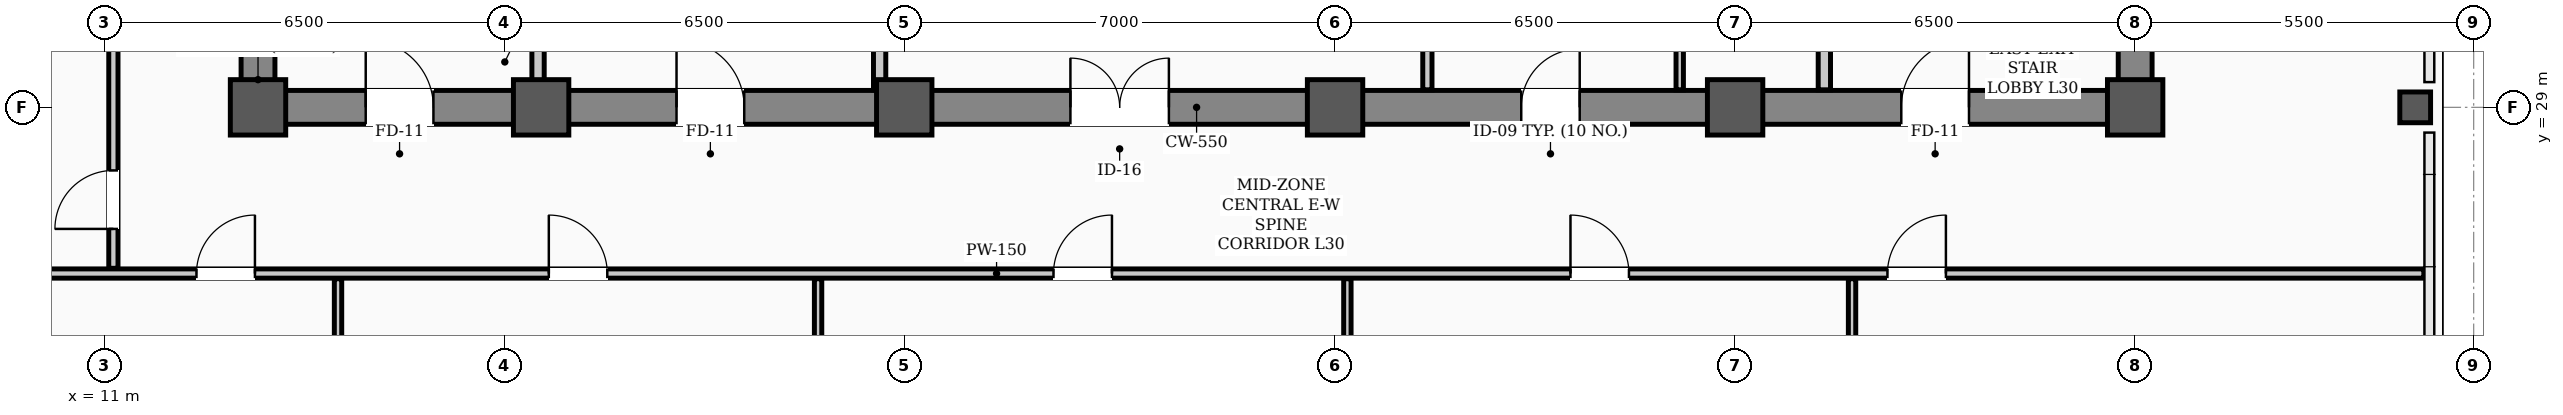
"""IFC4 building model, lengths in metres.
Left out: names, types, materials, properties, quantities, classifications, styles, units other than length and angle.
Written with IfcOpenShell. Run it as: python <this file> out.ifc"""

import sys

from ifc_helpers import new_model, si_unit, direction, frame, frame_2d, origin, origin_2d, place, context, subcontext, project, spatial, rectangle, hollow_rectangle, extrude, element, fill, save


model = new_model("IFC4")
c1 = context("Model", 3, precision=1e-05, world=origin(), true_north=direction((0.0, 1.0)))
c2 = subcontext(c1, "Body", "Model", "MODEL_VIEW")
j1 = project(units=[si_unit("LENGTHUNIT", "METRE"), si_unit("PLANEANGLEUNIT", "RADIAN")], contexts=[c1])
p1 = place(None, origin())
s1 = spatial("IfcSite", under=j1, at=p1, CompositionType="ELEMENT")
p2 = place(p1, origin())
s2 = spatial("IfcBuilding", under=s1, at=p2, CompositionType="ELEMENT")
p3 = place(p2, frame((0.0, 0.0, 122.7)))
s3 = spatial("IfcBuildingStorey", under=s2, at=p3, CompositionType="ELEMENT", Elevation=122.7)
for number, where, z_axis, x_axis in (
    (1, (13.5, 29.0, 0.0), (0.0, 0.0, 1.0), (1.0, 0.0, 0.0)),
    (2, (18.1, 29.0, 0.0), (0.0, 0.0, 1.0), (1.0, 0.0, 0.0)),
    (3, (24.0, 29.0, 0.0), (0.0, 0.0, 1.0), (1.0, 0.0, 0.0)),
    (4, (31.0, 29.0, 0.0), (0.0, 0.0, 1.0), (1.0, 0.0, 0.0)),
    (5, (37.5, 29.0, 0.0), (0.0, 0.0, 1.0), (1.0, 0.0, 0.0)),
    (6, (44.0, 29.0, 0.0), (0.0, 0.0, 1.0), (1.0, 0.0, 0.0)),
):
    element("IfcColumn", number, at=place(p3, frame(where, z_axis=z_axis, x_axis=x_axis)), inside=s3, PredefinedType="COLUMN", context=c2, shape_type="SweptSolid", body=[
        extrude(hollow_rectangle(XDim=0.9, YDim=0.9, WallThickness=0.035, InnerFilletRadius=0.017, OuterFilletRadius=0.052, at=origin_2d()), origin(), (0.0, 0.0, 1.0), 3.9),
    ])
p4 = place(p3, frame((48.55, 29.0, 0.0), z_axis=(0.0, 0.0, 1.0), x_axis=(1.0, 0.0, 0.0)))
e7 = element("IfcColumn", 7, at=p4, inside=s3, PredefinedType="COLUMN", context=c2, shape_type="SweptSolid", body=[
    extrude(hollow_rectangle(XDim=0.5, YDim=0.5, WallThickness=0.024, InnerFilletRadius=0.012, OuterFilletRadius=0.036, at=origin_2d()), origin(), (0.0, 0.0, 1.0), 3.9),
])
p5 = place(p3, frame((13.5, 29.0, 0.0), z_axis=(0.0, 0.0, 1.0), x_axis=(1.0, 0.0, 0.0)))
e8 = element("IfcWall", 8, at=p5, inside=s3, PredefinedType="SHEAR", context=c2, shape_type="SweptSolid", body=[
    extrude(rectangle(XDim=30.5, YDim=0.55, at=frame_2d((15.25, 0.0))), origin(), (0.0, 0.0, 1.0), 3.72),
])
p6 = place(p5, frame((1.75, 0.0, 0.0)))
e9 = element("IfcOpeningElement", 9, at=p6, cuts=e8, PredefinedType="OPENING", context=c2, shape_type="SweptSolid", body=[
    extrude(rectangle(XDim=1.1, YDim=2.08, at=frame_2d((0.55, 1.04))), frame((0.0, 0.285, 0.0), z_axis=(0.0, -1.0, 0.0), x_axis=(1.0, 0.0, 0.0)), (0.0, 0.0, 1.0), 0.57),
])
p7 = place(p5, frame((26.7, 0.0, 0.0)))
e10 = element("IfcOpeningElement", 10, at=p7, cuts=e8, PredefinedType="OPENING", context=c2, shape_type="SweptSolid", body=[
    extrude(rectangle(XDim=1.1, YDim=2.08, at=frame_2d((0.55, 1.04))), frame((0.0, 0.285, 0.0), z_axis=(0.0, -1.0, 0.0), x_axis=(1.0, 0.0, 0.0)), (0.0, 0.0, 1.0), 0.57),
])
p8 = place(p5, frame((6.8, 0.0, 0.0)))
e11 = element("IfcOpeningElement", 11, at=p8, cuts=e8, PredefinedType="OPENING", context=c2, shape_type="SweptSolid", body=[
    extrude(rectangle(XDim=1.1, YDim=2.08, at=frame_2d((0.55, 1.04))), frame((0.0, 0.285, 0.0), z_axis=(0.0, -1.0, 0.0), x_axis=(1.0, 0.0, 0.0)), (0.0, 0.0, 1.0), 0.57),
])
p9 = place(p5, frame((13.2, 0.0, 0.0)))
e12 = element("IfcOpeningElement", 12, at=p9, cuts=e8, PredefinedType="OPENING", context=c2, shape_type="SweptSolid", body=[
    extrude(rectangle(XDim=1.6, YDim=2.08, at=frame_2d((0.8, 1.04))), frame((0.0, 0.285, 0.0), z_axis=(0.0, -1.0, 0.0), x_axis=(1.0, 0.0, 0.0)), (0.0, 0.0, 1.0), 0.57),
])
p10 = place(p5, frame((20.525, 0.0, 0.0)))
e13 = element("IfcOpeningElement", 13, at=p10, cuts=e8, PredefinedType="OPENING", context=c2, shape_type="SweptSolid", body=[
    extrude(rectangle(XDim=0.95, YDim=2.08, at=frame_2d((0.475, 1.04))), frame((0.0, 0.285, 0.0), z_axis=(0.0, -1.0, 0.0), x_axis=(1.0, 0.0, 0.0)), (0.0, 0.0, 1.0), 0.57),
])
for number, where, z_axis, x_axis in (
    (14, (13.5, 29.35, 0.0), (0.0, 0.0, 1.0), (0.0, 1.0, 0.0)),
    (15, (44.0, 29.35, 0.0), (0.0, 0.0, 1.0), (0.0, 1.0, 0.0)),
):
    element("IfcWall", number, at=place(p3, frame(where, z_axis=z_axis, x_axis=x_axis)), inside=s3, PredefinedType="SHEAR", context=c2, shape_type="SweptSolid", body=[
        extrude(rectangle(XDim=8.6, YDim=0.55, at=frame_2d((4.3, 0.0))), origin(), (0.0, 0.0, 1.0), 3.72),
    ])
p11 = place(p3, frame((2.31, 26.3, 0.0), z_axis=(0.0, 0.0, 1.0), x_axis=(1.0, 0.0, 0.0)))
e16 = element("IfcWall", 16, at=p11, inside=s3, PredefinedType="PARTITIONING", context=c2, shape_type="SweptSolid", body=[
    extrude(rectangle(XDim=46.38, YDim=0.15, at=frame_2d((23.19, 0.0))), origin(), (0.0, 0.0, 1.0), 3.1),
])
p12 = place(p11, frame((10.19, 0.0, 0.0)))
e17 = element("IfcOpeningElement", 17, at=p12, cuts=e16, PredefinedType="OPENING", context=c2, shape_type="SweptSolid", body=[
    extrude(rectangle(XDim=0.95, YDim=2.08, at=frame_2d((0.475, 1.04))), frame((0.0, 0.085, 0.0), z_axis=(0.0, -1.0, 0.0), x_axis=(1.0, 0.0, 0.0)), (0.0, 0.0, 1.0), 0.17),
])
p13 = place(p11, frame((15.915, 0.0, 0.0)))
e18 = element("IfcOpeningElement", 18, at=p13, cuts=e16, PredefinedType="OPENING", context=c2, shape_type="SweptSolid", body=[
    extrude(rectangle(XDim=0.95, YDim=2.08, at=frame_2d((0.475, 1.04))), frame((0.0, 0.085, 0.0), z_axis=(0.0, -1.0, 0.0), x_axis=(1.0, 0.0, 0.0)), (0.0, 0.0, 1.0), 0.17),
])
p14 = place(p11, frame((24.115, 0.0, 0.0)))
e19 = element("IfcOpeningElement", 19, at=p14, cuts=e16, PredefinedType="OPENING", context=c2, shape_type="SweptSolid", body=[
    extrude(rectangle(XDim=0.95, YDim=2.08, at=frame_2d((0.475, 1.04))), frame((0.0, 0.085, 0.0), z_axis=(0.0, -1.0, 0.0), x_axis=(1.0, 0.0, 0.0)), (0.0, 0.0, 1.0), 0.17),
])
p15 = place(p11, frame((32.515, 0.0, 0.0)))
e20 = element("IfcOpeningElement", 20, at=p15, cuts=e16, PredefinedType="OPENING", context=c2, shape_type="SweptSolid", body=[
    extrude(rectangle(XDim=0.95, YDim=2.08, at=frame_2d((0.475, 1.04))), frame((0.0, 0.085, 0.0), z_axis=(0.0, -1.0, 0.0), x_axis=(1.0, 0.0, 0.0)), (0.0, 0.0, 1.0), 0.17),
])
p16 = place(p11, frame((37.665, 0.0, 0.0)))
e21 = element("IfcOpeningElement", 21, at=p16, cuts=e16, PredefinedType="OPENING", context=c2, shape_type="SweptSolid", body=[
    extrude(rectangle(XDim=0.95, YDim=2.08, at=frame_2d((0.475, 1.04))), frame((0.0, 0.085, 0.0), z_axis=(0.0, -1.0, 0.0), x_axis=(1.0, 0.0, 0.0)), (0.0, 0.0, 1.0), 0.17),
])
for number, where, z_axis, x_axis in (
    (22, (18.05, 29.285, 0.0), (0.0, 0.0, 1.0), (0.0, 1.0, 0.0)),
    (23, (38.95, 29.285, 0.0), (0.0, 0.0, 1.0), (0.0, 1.0, 0.0)),
):
    element("IfcWall", number, at=place(p3, frame(where, z_axis=z_axis, x_axis=x_axis)), inside=s3, PredefinedType="STANDARD", context=c2, shape_type="SweptSolid", body=[
        extrude(rectangle(XDim=1.015, YDim=0.2, at=frame_2d((0.508, 0.0))), origin(), (0.0, 0.0, 1.0), 3.3),
    ])
p17 = place(p3, frame((23.6, 29.285, 0.0), z_axis=(0.0, 0.0, 1.0), x_axis=(0.0, 1.0, 0.0)))
e24 = element("IfcWall", 24, at=p17, inside=s3, PredefinedType="STANDARD", context=c2, shape_type="SweptSolid", body=[
    extrude(rectangle(XDim=5.415, YDim=0.2, at=frame_2d((2.708, 0.0))), origin(), (0.0, 0.0, 1.0), 3.1),
])
p18 = place(p3, frame((32.5, 29.285, 0.0), z_axis=(0.0, 0.0, 1.0), x_axis=(0.0, 1.0, 0.0)))
e25 = element("IfcWall", 25, at=p18, inside=s3, PredefinedType="PARTITIONING", context=c2, shape_type="SweptSolid", body=[
    extrude(rectangle(XDim=2.48, YDim=0.15, at=frame_2d((1.24, 0.0))), origin(), (0.0, 0.0, 1.0), 3.3),
])
p19 = place(p3, frame((36.6, 29.285, 0.0), z_axis=(0.0, 0.0, 1.0), x_axis=(0.0, 1.0, 0.0)))
e26 = element("IfcWall", 26, at=p19, inside=s3, PredefinedType="PARTITIONING", context=c2, shape_type="SweptSolid", body=[
    extrude(rectangle(XDim=2.48, YDim=0.12, at=frame_2d((1.24, 0.0))), origin(), (0.0, 0.0, 1.0), 3.3),
])
p20 = place(p3, frame((11.15, 26.385, 0.0), z_axis=(0.0, 0.0, 1.0), x_axis=(0.0, 1.0, 0.0)))
e27 = element("IfcWall", 27, at=p20, inside=s3, PredefinedType="PARTITIONING", context=c2, shape_type="SweptSolid", body=[
    extrude(rectangle(XDim=11.28, YDim=0.15, at=frame_2d((5.64, 0.0))), origin(), (0.0, 0.0, 1.0), 3.0),
])
p21 = place(p20, frame((0.64, 0.0, 0.0)))
e28 = element("IfcOpeningElement", 28, at=p21, cuts=e27, PredefinedType="OPENING", context=c2, shape_type="SweptSolid", body=[
    extrude(rectangle(XDim=0.95, YDim=2.08, at=frame_2d((0.475, 1.04))), frame((0.0, 0.085, 0.0), z_axis=(0.0, -1.0, 0.0), x_axis=(1.0, 0.0, 0.0)), (0.0, 0.0, 1.0), 0.17),
])
p22 = place(p20, frame((8.615, 0.0, 0.0)))
e29 = element("IfcOpeningElement", 29, at=p22, cuts=e27, PredefinedType="OPENING", context=c2, shape_type="SweptSolid", body=[
    extrude(rectangle(XDim=0.95, YDim=2.08, at=frame_2d((0.475, 1.04))), frame((0.0, 0.085, 0.0), z_axis=(0.0, -1.0, 0.0), x_axis=(1.0, 0.0, 0.0)), (0.0, 0.0, 1.0), 0.17),
])
p23 = place(p3, frame((14.8, 10.81, 0.0), z_axis=(0.0, 0.0, 1.0), x_axis=(0.0, 1.0, 0.0)))
e30 = element("IfcWall", 30, at=p23, inside=s3, PredefinedType="PARTITIONING", context=c2, shape_type="SweptSolid", body=[
    extrude(rectangle(XDim=15.405, YDim=0.12, at=frame_2d((7.703, 0.0))), origin(), (0.0, 0.0, 1.0), 3.0),
])
p24 = place(p3, frame((22.6, 12.57, 0.0), z_axis=(0.0, 0.0, 1.0), x_axis=(0.0, 1.0, 0.0)))
e31 = element("IfcWall", 31, at=p24, inside=s3, PredefinedType="PARTITIONING", context=c2, shape_type="SweptSolid", body=[
    extrude(rectangle(XDim=13.645, YDim=0.12, at=frame_2d((6.823, 0.0))), origin(), (0.0, 0.0, 1.0), 3.0),
])
for number, where, z_axis, x_axis in (
    (32, (31.2, 10.81, 0.0), (0.0, 0.0, 1.0), (0.0, 1.0, 0.0)),
    (33, (39.4, 10.81, 0.0), (0.0, 0.0, 1.0), (0.0, 1.0, 0.0)),
):
    element("IfcWall", number, at=place(p3, frame(where, z_axis=z_axis, x_axis=x_axis)), inside=s3, PredefinedType="PARTITIONING", context=c2, shape_type="SweptSolid", body=[
        extrude(rectangle(XDim=15.405, YDim=0.12, at=frame_2d((7.703, 0.0))), origin(), (0.0, 0.0, 1.0), 3.0),
    ])
p25 = place(p6, origin())
e34 = element("IfcDoor", 34, at=p25, inside=s3, OperationType="SINGLE_SWING_LEFT", PredefinedType="DOOR", context=c2, shape_type="SweptSolid", body=[
    extrude(rectangle(XDim=1.1, YDim=2.08, at=frame_2d((0.55, 1.04))), frame((0.0, 0.025, 0.0), z_axis=(0.0, -1.0, 0.0), x_axis=(1.0, 0.0, 0.0)), (0.0, 0.0, 1.0), 0.05),
])
fill(e9, e34)
p26 = place(p7, origin())
e35 = element("IfcDoor", 35, at=p26, inside=s3, OperationType="SINGLE_SWING_RIGHT", PredefinedType="DOOR", context=c2, shape_type="SweptSolid", body=[
    extrude(rectangle(XDim=1.1, YDim=2.08, at=frame_2d((0.55, 1.04))), frame((0.0, 0.025, 0.0), z_axis=(0.0, -1.0, 0.0), x_axis=(1.0, 0.0, 0.0)), (0.0, 0.0, 1.0), 0.05),
])
fill(e10, e35)
p27 = place(p8, origin())
e36 = element("IfcDoor", 36, at=p27, inside=s3, OperationType="SINGLE_SWING_LEFT", PredefinedType="DOOR", context=c2, shape_type="SweptSolid", body=[
    extrude(rectangle(XDim=1.1, YDim=2.08, at=frame_2d((0.55, 1.04))), frame((0.0, 0.025, 0.0), z_axis=(0.0, -1.0, 0.0), x_axis=(1.0, 0.0, 0.0)), (0.0, 0.0, 1.0), 0.05),
])
fill(e11, e36)
p28 = place(p9, origin())
e37 = element("IfcDoor", 37, at=p28, inside=s3, OperationType="DOUBLE_DOOR_SINGLE_SWING", PredefinedType="DOOR", context=c2, shape_type="SweptSolid", body=[
    extrude(rectangle(XDim=1.6, YDim=2.08, at=frame_2d((0.8, 1.04))), frame((0.0, 0.025, 0.0), z_axis=(0.0, -1.0, 0.0), x_axis=(1.0, 0.0, 0.0)), (0.0, 0.0, 1.0), 0.05),
])
fill(e12, e37)
p29 = place(p10, origin())
e38 = element("IfcDoor", 38, at=p29, inside=s3, OperationType="SINGLE_SWING_RIGHT", PredefinedType="DOOR", context=c2, shape_type="SweptSolid", body=[
    extrude(rectangle(XDim=0.95, YDim=2.08, at=frame_2d((0.475, 1.04))), frame((0.0, 0.025, 0.0), z_axis=(0.0, -1.0, 0.0), x_axis=(1.0, 0.0, 0.0)), (0.0, 0.0, 1.0), 0.05),
])
fill(e13, e38)
p30 = place(p12, origin())
e39 = element("IfcDoor", 39, at=p30, inside=s3, OperationType="SINGLE_SWING_RIGHT", PredefinedType="DOOR", context=c2, shape_type="SweptSolid", body=[
    extrude(rectangle(XDim=0.95, YDim=2.08, at=frame_2d((0.475, 1.04))), frame((0.0, 0.025, 0.0), z_axis=(0.0, -1.0, 0.0), x_axis=(1.0, 0.0, 0.0)), (0.0, 0.0, 1.0), 0.05),
])
fill(e17, e39)
p31 = place(p13, origin())
e40 = element("IfcDoor", 40, at=p31, inside=s3, OperationType="SINGLE_SWING_LEFT", PredefinedType="DOOR", context=c2, shape_type="SweptSolid", body=[
    extrude(rectangle(XDim=0.95, YDim=2.08, at=frame_2d((0.475, 1.04))), frame((0.0, 0.025, 0.0), z_axis=(0.0, -1.0, 0.0), x_axis=(1.0, 0.0, 0.0)), (0.0, 0.0, 1.0), 0.05),
])
fill(e18, e40)
p32 = place(p14, origin())
e41 = element("IfcDoor", 41, at=p32, inside=s3, OperationType="SINGLE_SWING_RIGHT", PredefinedType="DOOR", context=c2, shape_type="SweptSolid", body=[
    extrude(rectangle(XDim=0.95, YDim=2.08, at=frame_2d((0.475, 1.04))), frame((0.0, 0.025, 0.0), z_axis=(0.0, -1.0, 0.0), x_axis=(1.0, 0.0, 0.0)), (0.0, 0.0, 1.0), 0.05),
])
fill(e19, e41)
p33 = place(p15, origin())
e42 = element("IfcDoor", 42, at=p33, inside=s3, OperationType="SINGLE_SWING_LEFT", PredefinedType="DOOR", context=c2, shape_type="SweptSolid", body=[
    extrude(rectangle(XDim=0.95, YDim=2.08, at=frame_2d((0.475, 1.04))), frame((0.0, 0.025, 0.0), z_axis=(0.0, -1.0, 0.0), x_axis=(1.0, 0.0, 0.0)), (0.0, 0.0, 1.0), 0.05),
])
fill(e20, e42)
p34 = place(p16, origin())
e43 = element("IfcDoor", 43, at=p34, inside=s3, OperationType="SINGLE_SWING_RIGHT", PredefinedType="DOOR", context=c2, shape_type="SweptSolid", body=[
    extrude(rectangle(XDim=0.95, YDim=2.08, at=frame_2d((0.475, 1.04))), frame((0.0, 0.025, 0.0), z_axis=(0.0, -1.0, 0.0), x_axis=(1.0, 0.0, 0.0)), (0.0, 0.0, 1.0), 0.05),
])
fill(e21, e43)
p35 = place(p21, origin())
e44 = element("IfcDoor", 44, at=p35, inside=s3, OperationType="SINGLE_SWING_LEFT", PredefinedType="DOOR", context=c2, shape_type="SweptSolid", body=[
    extrude(rectangle(XDim=0.95, YDim=2.08, at=frame_2d((0.475, 1.04))), frame((0.0, 0.025, 0.0), z_axis=(0.0, -1.0, 0.0), x_axis=(1.0, 0.0, 0.0)), (0.0, 0.0, 1.0), 0.05),
])
fill(e28, e44)
save(model, sys.argv[1])
